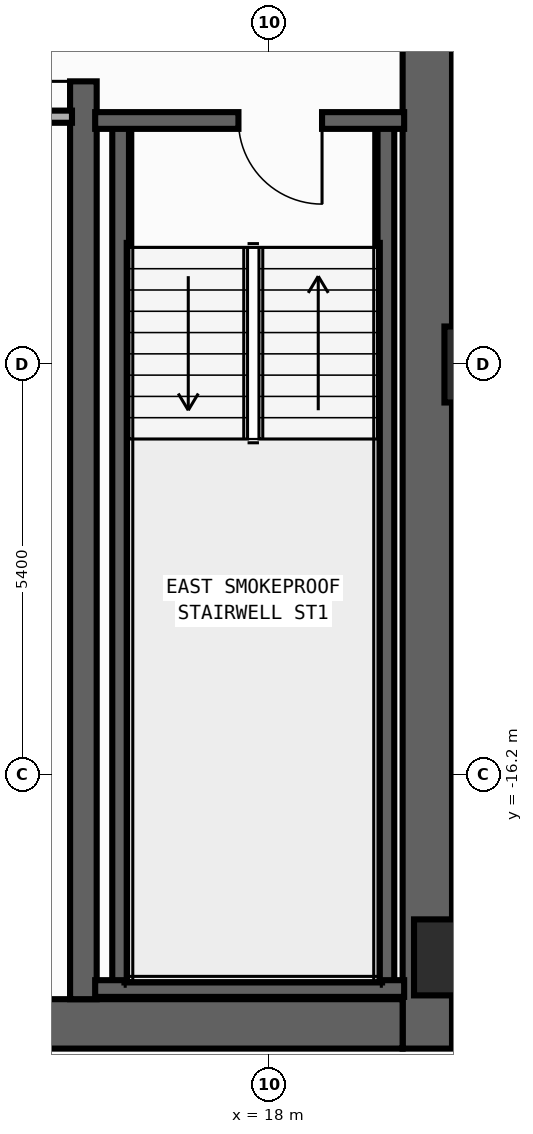
"""IFC4 building model, lengths in metres.
Left out: names, types, materials, properties, quantities, classifications, styles, units other than length and angle.
Written with IfcOpenShell. Run it as: python <this file> out.ifc"""

import sys

from ifc_helpers import new_model, si_unit, direction, frame, frame_2d, origin, origin_2d, place, context, subcontext, project, spatial, rectangle, extrude, element, fill, save


model = new_model("IFC4")
c1 = context("Model", 3, precision=1e-05, world=origin(), true_north=direction((0.0, 1.0)))
c2 = subcontext(c1, "Body", "Model", "MODEL_VIEW")
j1 = project(units=[si_unit("LENGTHUNIT", "METRE"), si_unit("PLANEANGLEUNIT", "RADIAN")], contexts=[c1])
p1 = place(None, origin())
s1 = spatial("IfcSite", under=j1, at=p1, CompositionType="ELEMENT")
p2 = place(p1, origin())
s2 = spatial("IfcBuilding", under=s1, at=p2, CompositionType="ELEMENT")
p3 = place(p2, frame((0.0, 0.0, 180.2)))
s3 = spatial("IfcBuildingStorey", under=s2, at=p3, CompositionType="ELEMENT", Elevation=180.2)
p4 = place(p3, frame((20.075, -19.8, 0.0), z_axis=(0.0, 0.0, 1.0), x_axis=(0.0, 1.0, 0.0)))
e1 = element("IfcWall", 1, at=p4, inside=s3, PredefinedType="SHEAR", context=c2, shape_type="SweptSolid", body=[
    extrude(rectangle(XDim=27.0, YDim=0.65, at=frame_2d((13.5, 0.0))), origin(), (0.0, 0.0, 1.0), 3.54),
])
p5 = place(p3, frame((12.65, -19.475, 0.0), z_axis=(0.0, 0.0, 1.0), x_axis=(1.0, 0.0, 0.0)))
e2 = element("IfcWall", 2, at=p5, inside=s3, PredefinedType="SHEAR", context=c2, shape_type="SweptSolid", body=[
    extrude(rectangle(XDim=7.1, YDim=0.65, at=frame_2d((3.55, 0.0))), origin(), (0.0, 0.0, 1.0), 3.54),
])
p6 = place(p3, frame((15.55, -19.15, 0.0), z_axis=(0.0, 0.0, 1.0), x_axis=(0.0, 1.0, 0.0)))
e3 = element("IfcWall", 3, at=p6, inside=s3, PredefinedType="SHEAR", context=c2, shape_type="SweptSolid", body=[
    extrude(rectangle(XDim=25.7, YDim=0.35, at=frame_2d((12.85, 0.0))), origin(), (0.0, 0.0, 1.0), 3.54),
])
p7 = place(p6, frame((12.075, 0.0, 0.0)))
e4 = element("IfcOpeningElement", 4, at=p7, cuts=e3, PredefinedType="OPENING", context=c2, shape_type="SweptSolid", body=[
    extrude(rectangle(XDim=1.15, YDim=2.2, at=frame_2d((0.575, 1.1))), frame((0.0, 0.185, 0.0), z_axis=(0.0, -1.0, 0.0), x_axis=(1.0, 0.0, 0.0)), (0.0, 0.0, 1.0), 0.37),
])
p8 = place(p6, frame((24.475, 0.0, 0.0)))
e5 = element("IfcOpeningElement", 5, at=p8, cuts=e3, PredefinedType="OPENING", context=c2, shape_type="SweptSolid", body=[
    extrude(rectangle(XDim=0.85, YDim=2.1, at=frame_2d((0.425, 1.05))), frame((0.0, 0.185, 0.0), z_axis=(0.0, -1.0, 0.0), x_axis=(1.0, 0.0, 0.0)), (0.0, 0.0, 1.0), 0.37),
])
for number, where, z_axis, x_axis in (
    (6, (16.04, -19.01, 0.0), (0.0, 0.0, 1.0), (0.0, 1.0, 0.0)),
    (7, (19.53, -19.01, 0.0), (0.0, 0.0, 1.0), (0.0, 1.0, 0.0)),
):
    element("IfcWall", number, at=place(p3, frame(where, z_axis=z_axis, x_axis=x_axis)), inside=s3, PredefinedType="SHEAR", context=c2, shape_type="SweptSolid", body=[
        extrude(rectangle(XDim=11.42, YDim=0.22, at=frame_2d((5.71, 0.0))), origin(), (0.0, 0.0, 1.0), 3.54),
    ])
p9 = place(p3, frame((15.705, -19.01, 0.0), z_axis=(0.0, 0.0, 1.0), x_axis=(1.0, 0.0, 0.0)))
e8 = element("IfcWall", 8, at=p9, inside=s3, PredefinedType="SHEAR", context=c2, shape_type="SweptSolid", body=[
    extrude(rectangle(XDim=4.065, YDim=0.22, at=frame_2d((2.032, 0.0))), origin(), (0.0, 0.0, 1.0), 3.54),
])
p10 = place(p3, frame((19.77, -7.59, 0.0), z_axis=(0.0, 0.0, 1.0), x_axis=(-1.0, 0.0, 0.0)))
e9 = element("IfcWall", 9, at=p10, inside=s3, PredefinedType="SHEAR", context=c2, shape_type="SweptSolid", body=[
    extrude(rectangle(XDim=4.065, YDim=0.22, at=frame_2d((2.032, 0.0))), origin(), (0.0, 0.0, 1.0), 3.54),
])
p11 = place(p10, frame((1.08, 0.0, 0.0)))
e10 = element("IfcOpeningElement", 10, at=p11, cuts=e9, PredefinedType="OPENING", context=c2, shape_type="SweptSolid", body=[
    extrude(rectangle(XDim=1.1, YDim=2.2, at=frame_2d((0.55, 1.1))), frame((0.0, 0.12, 0.0), z_axis=(0.0, -1.0, 0.0), x_axis=(1.0, 0.0, 0.0)), (0.0, 0.0, 1.0), 0.24),
])
for number, where, z_axis, x_axis in (
    (11, (20.4, -18.6, 0.0), (0.0, 0.0, 1.0), (1.0, 0.0, 0.0)),
    (12, (20.8, -10.8, 0.0), (0.0, 0.0, 1.0), (1.0, 0.0, 0.0)),
):
    element("IfcColumn", number, at=place(p3, frame(where, z_axis=z_axis, x_axis=x_axis)), inside=s3, PredefinedType="COLUMN", context=c2, shape_type="SweptSolid", body=[
        extrude(rectangle(XDim=1.0, YDim=1.0, at=origin_2d()), origin(), (0.0, 0.0, 1.0), 3.8),
    ])
p12 = place(p3, frame((12.8, -7.54, 0.0), z_axis=(0.0, 0.0, 1.0), x_axis=(1.0, 0.0, 0.0)))
e13 = element("IfcWall", 13, at=p12, inside=s3, PredefinedType="STANDARD", context=c2, shape_type="SweptSolid", body=[
    extrude(rectangle(XDim=2.6, YDim=0.16, at=frame_2d((1.3, 0.0))), origin(), (0.0, 0.0, 1.0), 3.54),
])
p13 = place(p11, origin())
e14 = element("IfcDoor", 14, at=p13, inside=s3, OperationType="SINGLE_SWING_LEFT", PredefinedType="DOOR", context=c2, shape_type="SweptSolid", body=[
    extrude(rectangle(XDim=1.1, YDim=2.2, at=frame_2d((0.55, 1.1))), frame((0.0, 0.025, 0.0), z_axis=(0.0, -1.0, 0.0), x_axis=(1.0, 0.0, 0.0)), (0.0, 0.0, 1.0), 0.05),
])
fill(e10, e14)
p14 = place(p7, origin())
e15 = element("IfcDoor", 15, at=p14, inside=s3, OperationType="SINGLE_SWING_LEFT", PredefinedType="DOOR", context=c2, shape_type="SweptSolid", body=[
    extrude(rectangle(XDim=1.15, YDim=2.2, at=frame_2d((0.575, 1.1))), frame((0.0, 0.025, 0.0), z_axis=(0.0, -1.0, 0.0), x_axis=(1.0, 0.0, 0.0)), (0.0, 0.0, 1.0), 0.05),
])
fill(e4, e15)
save(model, sys.argv[1])
